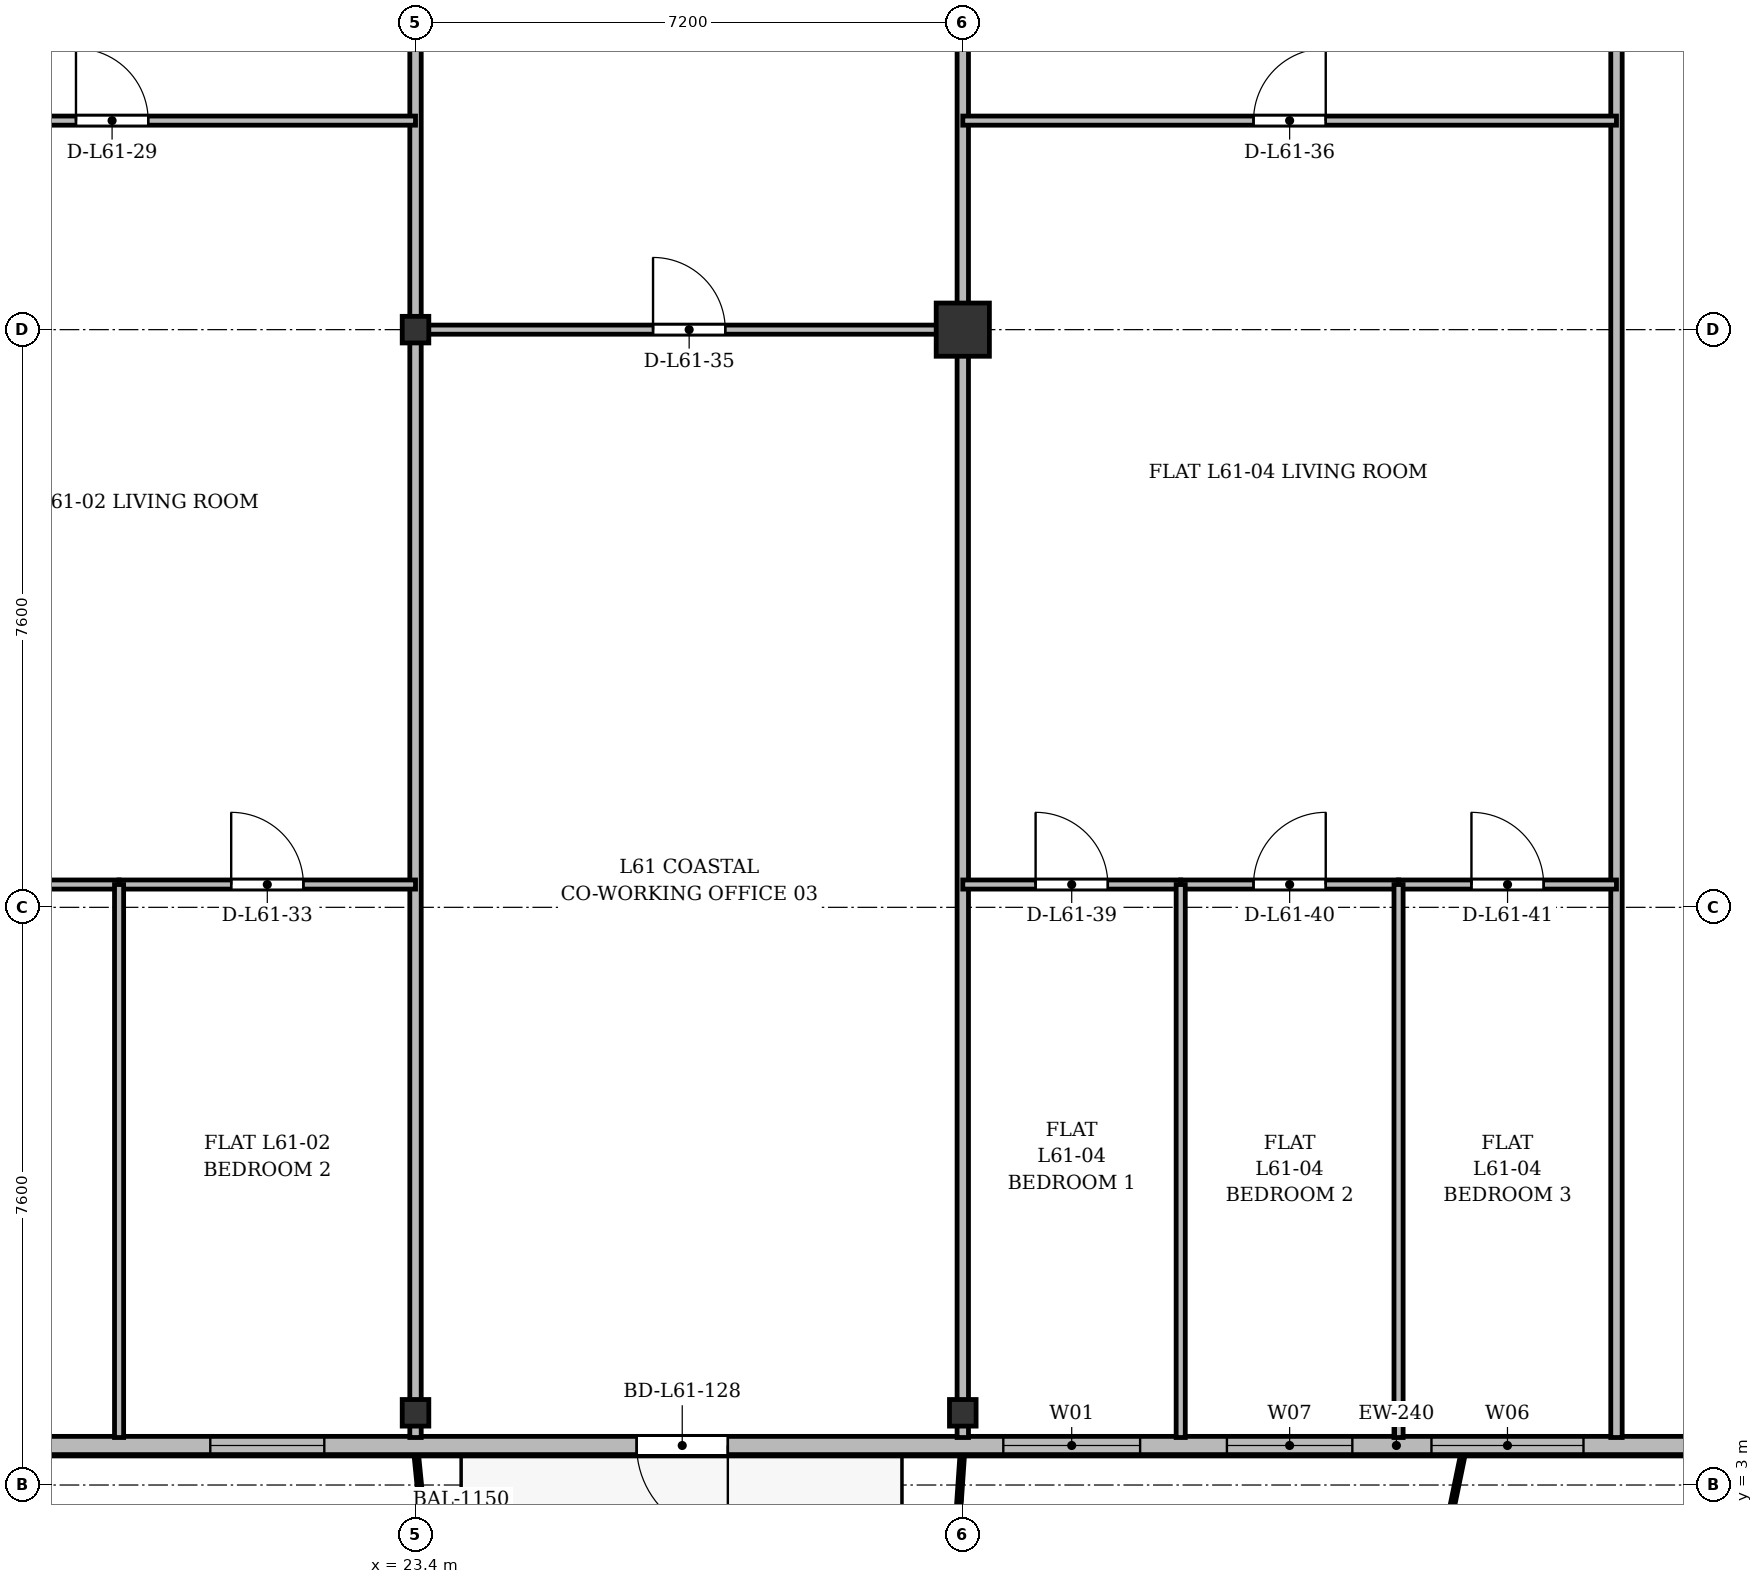
"""IFC4 building model, lengths in metres.
Left out: names, types, materials, properties, quantities, classifications, styles, units other than length and angle.
Written with IfcOpenShell. Run it as: python <this file> out.ifc"""

import sys

from ifc_helpers import new_model, si_unit, direction, frame, frame_2d, origin, origin_2d, place, context, subcontext, project, spatial, rectangle, i_section, extrude, source, transform, mapped, element, fill, save


model = new_model("IFC4")
c1 = context("Model", 3, precision=1e-05, world=origin(), true_north=direction((0.0, 1.0)))
c2 = subcontext(c1, "Body", "Model", "MODEL_VIEW")
j1 = project(units=[si_unit("LENGTHUNIT", "METRE"), si_unit("PLANEANGLEUNIT", "RADIAN")], contexts=[c1])
p1 = place(None, origin())
s1 = spatial("IfcSite", under=j1, at=p1, CompositionType="ELEMENT")
p2 = place(p1, origin())
s2 = spatial("IfcBuilding", under=s1, at=p2, CompositionType="ELEMENT")
p3 = place(p2, frame((0.0, 0.0, 233.7)))
s3 = spatial("IfcBuildingStorey", under=s2, at=p3, CompositionType="ELEMENT", Elevation=233.7)
m1 = source(origin(), c2, "Body", "SweptSolid", [
    extrude(i_section(OverallWidth=0.35, OverallDepth=0.35, WebThickness=0.018, FlangeThickness=0.028, at=origin_2d()), origin(), (0.0, 0.0, 1.0), 3.6),
])
for number, where, z_axis, x_axis in (
    (1, (23.4, 3.95, 0.0), (0.0, 0.0, 1.0), (1.0, 0.0, 0.0)),
    (2, (23.4, 18.2, 0.0), (0.0, 0.0, 1.0), (1.0, 0.0, 0.0)),
    (3, (30.6, 3.95, 0.0), (0.0, 0.0, 1.0), (1.0, 0.0, 0.0)),
):
    element("IfcColumn", number, at=place(p3, frame(where, z_axis=z_axis, x_axis=x_axis)), inside=s3, PredefinedType="COLUMN", context=c2, shape_type="MappedRepresentation", body=[
        mapped(m1, transform((0.0, 0.0, 0.0), x_axis=(1.0, 0.0, 0.0), y_axis=(0.0, 1.0, 0.0), z_axis=(0.0, 0.0, 1.0), scale=1.0)),
    ])
m2 = source(origin(), c2, "Body", "SweptSolid", [
    extrude(rectangle(XDim=0.7, YDim=0.7, at=origin_2d()), origin(), (0.0, 0.0, 1.0), 3.6),
])
p4 = place(p3, frame((30.6, 18.2, 0.0), z_axis=(0.0, 0.0, 1.0), x_axis=(1.0, 0.0, 0.0)))
e4 = element("IfcColumn", 4, at=p4, inside=s3, PredefinedType="COLUMN", context=c2, shape_type="MappedRepresentation", body=[
    mapped(m2, transform((0.0, 0.0, 0.0), x_axis=(1.0, 0.0, 0.0), y_axis=(0.0, 1.0, 0.0), z_axis=(0.0, 0.0, 1.0), scale=1.0)),
])
p5 = place(p3, frame((44.8, 3.52, 0.0), z_axis=(0.0, 0.0, 1.0), x_axis=(-1.0, 0.0, 0.0)))
e5 = element("IfcWall", 5, at=p5, inside=s3, PredefinedType="SOLIDWALL", context=c2, shape_type="SweptSolid", body=[
    extrude(rectangle(XDim=33.8, YDim=0.24, at=frame_2d((16.9, 0.0))), origin(), (0.0, 0.0, 1.0), 3.36),
])
p6 = place(p5, frame((2.55, 0.0, 0.9)))
e6 = element("IfcOpeningElement", 6, at=p6, cuts=e5, PredefinedType="OPENING", context=c2, shape_type="SweptSolid", body=[
    extrude(rectangle(XDim=1.5, YDim=1.75, at=frame_2d((0.75, 0.875))), frame((0.0, 0.13, 0.0), z_axis=(0.0, -1.0, 0.0), x_axis=(1.0, 0.0, 0.0)), (0.0, 0.0, 1.0), 0.26),
])
p7 = place(p5, frame((6.034, 0.0, 0.9)))
e7 = element("IfcOpeningElement", 7, at=p7, cuts=e5, PredefinedType="OPENING", context=c2, shape_type="SweptSolid", body=[
    extrude(rectangle(XDim=2.0, YDim=1.95, at=frame_2d((1.0, 0.975))), frame((0.0, 0.13, 0.0), z_axis=(0.0, -1.0, 0.0), x_axis=(1.0, 0.0, 0.0)), (0.0, 0.0, 1.0), 0.26),
])
p8 = place(p5, frame((9.075, 0.0, 0.9)))
e8 = element("IfcOpeningElement", 8, at=p8, cuts=e5, PredefinedType="OPENING", context=c2, shape_type="SweptSolid", body=[
    extrude(rectangle(XDim=1.65, YDim=1.85, at=frame_2d((0.825, 0.925))), frame((0.0, 0.13, 0.0), z_axis=(0.0, -1.0, 0.0), x_axis=(1.0, 0.0, 0.0)), (0.0, 0.0, 1.0), 0.26),
])
p9 = place(p5, frame((11.867, 0.0, 0.9)))
e9 = element("IfcOpeningElement", 9, at=p9, cuts=e5, PredefinedType="OPENING", context=c2, shape_type="SweptSolid", body=[
    extrude(rectangle(XDim=1.8, YDim=1.8, at=frame_2d((0.9, 0.9))), frame((0.0, 0.13, 0.0), z_axis=(0.0, -1.0, 0.0), x_axis=(1.0, 0.0, 0.0)), (0.0, 0.0, 1.0), 0.26),
])
p10 = place(p5, frame((17.291, 0.0, 0.0)))
e10 = element("IfcOpeningElement", 10, at=p10, cuts=e5, PredefinedType="OPENING", context=c2, shape_type="SweptSolid", body=[
    extrude(rectangle(XDim=1.2, YDim=2.2, at=frame_2d((0.6, 1.1))), frame((0.0, 0.13, 0.0), z_axis=(0.0, -1.0, 0.0), x_axis=(1.0, 0.0, 0.0)), (0.0, 0.0, 1.0), 0.26),
])
p11 = place(p5, frame((22.6, 0.0, 0.9)))
e11 = element("IfcOpeningElement", 11, at=p11, cuts=e5, PredefinedType="OPENING", context=c2, shape_type="SweptSolid", body=[
    extrude(rectangle(XDim=1.5, YDim=1.75, at=frame_2d((0.75, 0.875))), frame((0.0, 0.13, 0.0), z_axis=(0.0, -1.0, 0.0), x_axis=(1.0, 0.0, 0.0)), (0.0, 0.0, 1.0), 0.26),
])
p12 = place(p5, frame((26.25, 0.0, 0.9)))
e12 = element("IfcOpeningElement", 12, at=p12, cuts=e5, PredefinedType="OPENING", context=c2, shape_type="SweptSolid", body=[
    extrude(rectangle(XDim=2.0, YDim=1.95, at=frame_2d((1.0, 0.975))), frame((0.0, 0.13, 0.0), z_axis=(0.0, -1.0, 0.0), x_axis=(1.0, 0.0, 0.0)), (0.0, 0.0, 1.0), 0.26),
])
p13 = place(p5, frame((30.63, 0.0, 0.9)))
e13 = element("IfcOpeningElement", 13, at=p13, cuts=e5, PredefinedType="OPENING", context=c2, shape_type="SweptSolid", body=[
    extrude(rectangle(XDim=1.65, YDim=1.85, at=frame_2d((0.825, 0.925))), frame((0.0, 0.13, 0.0), z_axis=(0.0, -1.0, 0.0), x_axis=(1.0, 0.0, 0.0)), (0.0, 0.0, 1.0), 0.26),
])
for number, where, z_axis, x_axis in (
    (14, (23.4, 3.625, 0.0), (0.0, 0.0, 1.0), (0.0, 1.0, 0.0)),
    (15, (30.6, 3.625, 0.0), (0.0, 0.0, 1.0), (0.0, 1.0, 0.0)),
):
    element("IfcWall", number, at=place(p3, frame(where, z_axis=z_axis, x_axis=x_axis)), inside=s3, PredefinedType="PARTITIONING", context=c2, shape_type="SweptSolid", body=[
        extrude(rectangle(XDim=27.375, YDim=0.15, at=frame_2d((13.688, 0.0))), origin(), (0.0, 0.0, 1.0), 2.86),
    ])
p14 = place(p3, frame((39.2, 3.625, 0.0), z_axis=(0.0, 0.0, 1.0), x_axis=(0.0, 1.0, 0.0)))
e16 = element("IfcWall", 16, at=p14, inside=s3, PredefinedType="PARTITIONING", context=c2, shape_type="SweptSolid", body=[
    extrude(rectangle(XDim=27.375, YDim=0.15, at=frame_2d((13.688, 0.0))), origin(), (0.0, 0.0, 1.0), 2.91),
])
p15 = place(p3, frame((15.6, 20.95, 0.0), z_axis=(0.0, 0.0, 1.0), x_axis=(1.0, 0.0, 0.0)))
e17 = element("IfcWall", 17, at=p15, inside=s3, PredefinedType="PARTITIONING", context=c2, shape_type="SweptSolid", body=[
    extrude(rectangle(XDim=7.8, YDim=0.12, at=frame_2d((3.9, 0.0))), origin(), (0.0, 0.0, 1.0), 2.86),
])
p16 = place(p15, frame((3.333, 0.0, 0.0)))
e18 = element("IfcOpeningElement", 18, at=p16, cuts=e17, PredefinedType="OPENING", context=c2, shape_type="SweptSolid", body=[
    extrude(rectangle(XDim=0.95, YDim=2.15, at=frame_2d((0.475, 1.075))), frame((0.0, 0.07, 0.0), z_axis=(0.0, -1.0, 0.0), x_axis=(1.0, 0.0, 0.0)), (0.0, 0.0, 1.0), 0.14),
])
p17 = place(p3, frame((15.6, 10.9, 0.0), z_axis=(0.0, 0.0, 1.0), x_axis=(1.0, 0.0, 0.0)))
e19 = element("IfcWall", 19, at=p17, inside=s3, PredefinedType="PARTITIONING", context=c2, shape_type="SweptSolid", body=[
    extrude(rectangle(XDim=3.9, YDim=0.12, at=frame_2d((1.95, 0.0))), origin(), (0.0, 0.0, 1.0), 2.86),
])
p18 = place(p17, frame((1.475, 0.0, 0.0)))
e20 = element("IfcOpeningElement", 20, at=p18, cuts=e19, PredefinedType="OPENING", context=c2, shape_type="SweptSolid", body=[
    extrude(rectangle(XDim=0.95, YDim=2.15, at=frame_2d((0.475, 1.075))), frame((0.0, 0.07, 0.0), z_axis=(0.0, -1.0, 0.0), x_axis=(1.0, 0.0, 0.0)), (0.0, 0.0, 1.0), 0.14),
])
p19 = place(p3, frame((19.5, 10.9, 0.0), z_axis=(0.0, 0.0, 1.0), x_axis=(1.0, 0.0, 0.0)))
e21 = element("IfcWall", 21, at=p19, inside=s3, PredefinedType="PARTITIONING", context=c2, shape_type="SweptSolid", body=[
    extrude(rectangle(XDim=3.9, YDim=0.12, at=frame_2d((1.95, 0.0))), origin(), (0.0, 0.0, 1.0), 2.86),
])
p20 = place(p19, frame((1.475, 0.0, 0.0)))
e22 = element("IfcOpeningElement", 22, at=p20, cuts=e21, PredefinedType="OPENING", context=c2, shape_type="SweptSolid", body=[
    extrude(rectangle(XDim=0.95, YDim=2.15, at=frame_2d((0.475, 1.075))), frame((0.0, 0.07, 0.0), z_axis=(0.0, -1.0, 0.0), x_axis=(1.0, 0.0, 0.0)), (0.0, 0.0, 1.0), 0.14),
])
p21 = place(p3, frame((19.5, 3.625, 0.0), z_axis=(0.0, 0.0, 1.0), x_axis=(0.0, 1.0, 0.0)))
e23 = element("IfcWall", 23, at=p21, inside=s3, PredefinedType="PARTITIONING", context=c2, shape_type="SweptSolid", body=[
    extrude(rectangle(XDim=7.275, YDim=0.12, at=frame_2d((3.637, 0.0))), origin(), (0.0, 0.0, 1.0), 2.91),
])
p22 = place(p3, frame((23.4, 18.2, 0.0), z_axis=(0.0, 0.0, 1.0), x_axis=(1.0, 0.0, 0.0)))
e24 = element("IfcWall", 24, at=p22, inside=s3, PredefinedType="PARTITIONING", context=c2, shape_type="SweptSolid", body=[
    extrude(rectangle(XDim=7.2, YDim=0.12, at=frame_2d((3.6, 0.0))), origin(), (0.0, 0.0, 1.0), 2.91),
])
p23 = place(p22, frame((3.125, 0.0, 0.0)))
e25 = element("IfcOpeningElement", 25, at=p23, cuts=e24, PredefinedType="OPENING", context=c2, shape_type="SweptSolid", body=[
    extrude(rectangle(XDim=0.95, YDim=2.15, at=frame_2d((0.475, 1.075))), frame((0.0, 0.07, 0.0), z_axis=(0.0, -1.0, 0.0), x_axis=(1.0, 0.0, 0.0)), (0.0, 0.0, 1.0), 0.14),
])
p24 = place(p3, frame((30.6, 20.95, 0.0), z_axis=(0.0, 0.0, 1.0), x_axis=(1.0, 0.0, 0.0)))
e26 = element("IfcWall", 26, at=p24, inside=s3, PredefinedType="PARTITIONING", context=c2, shape_type="SweptSolid", body=[
    extrude(rectangle(XDim=8.6, YDim=0.12, at=frame_2d((4.3, 0.0))), origin(), (0.0, 0.0, 1.0), 2.86),
])
p25 = place(p24, frame((3.825, 0.0, 0.0)))
e27 = element("IfcOpeningElement", 27, at=p25, cuts=e26, PredefinedType="OPENING", context=c2, shape_type="SweptSolid", body=[
    extrude(rectangle(XDim=0.95, YDim=2.15, at=frame_2d((0.475, 1.075))), frame((0.0, 0.07, 0.0), z_axis=(0.0, -1.0, 0.0), x_axis=(1.0, 0.0, 0.0)), (0.0, 0.0, 1.0), 0.14),
])
p26 = place(p3, frame((30.6, 10.9, 0.0), z_axis=(0.0, 0.0, 1.0), x_axis=(1.0, 0.0, 0.0)))
e28 = element("IfcWall", 28, at=p26, inside=s3, PredefinedType="PARTITIONING", context=c2, shape_type="SweptSolid", body=[
    extrude(rectangle(XDim=2.867, YDim=0.12, at=frame_2d((1.434, 0.0))), origin(), (0.0, 0.0, 1.0), 2.86),
])
p27 = place(p26, frame((0.958, 0.0, 0.0)))
e29 = element("IfcOpeningElement", 29, at=p27, cuts=e28, PredefinedType="OPENING", context=c2, shape_type="SweptSolid", body=[
    extrude(rectangle(XDim=0.95, YDim=2.15, at=frame_2d((0.475, 1.075))), frame((0.0, 0.07, 0.0), z_axis=(0.0, -1.0, 0.0), x_axis=(1.0, 0.0, 0.0)), (0.0, 0.0, 1.0), 0.14),
])
p28 = place(p3, frame((33.467, 10.9, 0.0), z_axis=(0.0, 0.0, 1.0), x_axis=(1.0, 0.0, 0.0)))
e30 = element("IfcWall", 30, at=p28, inside=s3, PredefinedType="PARTITIONING", context=c2, shape_type="SweptSolid", body=[
    extrude(rectangle(XDim=2.866, YDim=0.12, at=frame_2d((1.433, 0.0))), origin(), (0.0, 0.0, 1.0), 3.36),
])
p29 = place(p28, frame((0.958, 0.0, 0.0)))
e31 = element("IfcOpeningElement", 31, at=p29, cuts=e30, PredefinedType="OPENING", context=c2, shape_type="SweptSolid", body=[
    extrude(rectangle(XDim=0.95, YDim=2.15, at=frame_2d((0.475, 1.075))), frame((0.0, 0.07, 0.0), z_axis=(0.0, -1.0, 0.0), x_axis=(1.0, 0.0, 0.0)), (0.0, 0.0, 1.0), 0.14),
])
p30 = place(p3, frame((33.467, 3.625, 0.0), z_axis=(0.0, 0.0, 1.0), x_axis=(0.0, 1.0, 0.0)))
e32 = element("IfcWall", 32, at=p30, inside=s3, PredefinedType="PARTITIONING", context=c2, shape_type="SweptSolid", body=[
    extrude(rectangle(XDim=7.275, YDim=0.12, at=frame_2d((3.637, 0.0))), origin(), (0.0, 0.0, 1.0), 2.91),
])
p31 = place(p3, frame((36.333, 10.9, 0.0), z_axis=(0.0, 0.0, 1.0), x_axis=(1.0, 0.0, 0.0)))
e33 = element("IfcWall", 33, at=p31, inside=s3, PredefinedType="PARTITIONING", context=c2, shape_type="SweptSolid", body=[
    extrude(rectangle(XDim=2.867, YDim=0.12, at=frame_2d((1.434, 0.0))), origin(), (0.0, 0.0, 1.0), 3.36),
])
p32 = place(p31, frame((0.959, 0.0, 0.0)))
e34 = element("IfcOpeningElement", 34, at=p32, cuts=e33, PredefinedType="OPENING", context=c2, shape_type="SweptSolid", body=[
    extrude(rectangle(XDim=0.95, YDim=2.15, at=frame_2d((0.475, 1.075))), frame((0.0, 0.07, 0.0), z_axis=(0.0, -1.0, 0.0), x_axis=(1.0, 0.0, 0.0)), (0.0, 0.0, 1.0), 0.14),
])
p33 = place(p3, frame((36.333, 3.625, 0.0), z_axis=(0.0, 0.0, 1.0), x_axis=(0.0, 1.0, 0.0)))
e35 = element("IfcWall", 35, at=p33, inside=s3, PredefinedType="PARTITIONING", context=c2, shape_type="SweptSolid", body=[
    extrude(rectangle(XDim=7.275, YDim=0.12, at=frame_2d((3.637, 0.0))), origin(), (0.0, 0.0, 1.0), 2.91),
])
m3 = source(origin(), c2, "Body", "SweptSolid", [
    extrude(rectangle(XDim=2.0, YDim=1.95, at=frame_2d((1.0, 0.975))), frame((0.0, 0.03, 0.0), z_axis=(0.0, -1.0, 0.0), x_axis=(1.0, 0.0, 0.0)), (0.0, 0.0, 1.0), 0.06),
])
p34 = place(p7, origin())
e36 = element("IfcWindow", 36, at=p34, inside=s3, PartitioningType="SINGLE_PANEL", PredefinedType="WINDOW", context=c2, shape_type="MappedRepresentation", body=[
    mapped(m3, transform((0.0, 0.0, 0.0), x_axis=(1.0, 0.0, 0.0), y_axis=(0.0, 1.0, 0.0), z_axis=(0.0, 0.0, 1.0), scale=1.0)),
])
fill(e7, e36)
m4 = source(origin(), c2, "Body", "SweptSolid", [
    extrude(rectangle(XDim=1.65, YDim=1.85, at=frame_2d((0.825, 0.925))), frame((0.0, 0.03, 0.0), z_axis=(0.0, -1.0, 0.0), x_axis=(1.0, 0.0, 0.0)), (0.0, 0.0, 1.0), 0.06),
])
p35 = place(p8, origin())
e37 = element("IfcWindow", 37, at=p35, inside=s3, PartitioningType="SINGLE_PANEL", PredefinedType="WINDOW", context=c2, shape_type="MappedRepresentation", body=[
    mapped(m4, transform((0.0, 0.0, 0.0), x_axis=(1.0, 0.0, 0.0), y_axis=(0.0, 1.0, 0.0), z_axis=(0.0, 0.0, 1.0), scale=1.0)),
])
fill(e8, e37)
m5 = source(origin(), c2, "Body", "SweptSolid", [
    extrude(rectangle(XDim=1.8, YDim=1.8, at=frame_2d((0.9, 0.9))), frame((0.0, 0.03, 0.0), z_axis=(0.0, -1.0, 0.0), x_axis=(1.0, 0.0, 0.0)), (0.0, 0.0, 1.0), 0.06),
])
p36 = place(p9, origin())
e38 = element("IfcWindow", 38, at=p36, inside=s3, PartitioningType="SINGLE_PANEL", PredefinedType="WINDOW", context=c2, shape_type="MappedRepresentation", body=[
    mapped(m5, transform((0.0, 0.0, 0.0), x_axis=(1.0, 0.0, 0.0), y_axis=(0.0, 1.0, 0.0), z_axis=(0.0, 0.0, 1.0), scale=1.0)),
])
fill(e9, e38)
m6 = source(origin(), c2, "Body", "SweptSolid", [
    extrude(rectangle(XDim=1.2, YDim=2.2, at=frame_2d((0.6, 1.1))), frame((0.0, 0.025, 0.0), z_axis=(0.0, -1.0, 0.0), x_axis=(1.0, 0.0, 0.0)), (0.0, 0.0, 1.0), 0.05),
])
p37 = place(p10, origin())
e39 = element("IfcDoor", 39, at=p37, inside=s3, OperationType="SINGLE_SWING_LEFT", PredefinedType="DOOR", context=c2, shape_type="MappedRepresentation", body=[
    mapped(m6, transform((0.0, 0.0, 0.0), x_axis=(1.0, 0.0, 0.0), y_axis=(0.0, 1.0, 0.0), z_axis=(0.0, 0.0, 1.0), scale=1.0)),
])
fill(e10, e39)
m7 = source(origin(), c2, "Body", "SweptSolid", [
    extrude(rectangle(XDim=1.5, YDim=1.75, at=frame_2d((0.75, 0.875))), frame((0.0, 0.03, 0.0), z_axis=(0.0, -1.0, 0.0), x_axis=(1.0, 0.0, 0.0)), (0.0, 0.0, 1.0), 0.06),
])
p38 = place(p11, origin())
e40 = element("IfcWindow", 40, at=p38, inside=s3, PartitioningType="SINGLE_PANEL", PredefinedType="WINDOW", context=c2, shape_type="MappedRepresentation", body=[
    mapped(m7, transform((0.0, 0.0, 0.0), x_axis=(1.0, 0.0, 0.0), y_axis=(0.0, 1.0, 0.0), z_axis=(0.0, 0.0, 1.0), scale=1.0)),
])
fill(e11, e40)
m8 = source(origin(), c2, "Body", "SweptSolid", [
    extrude(rectangle(XDim=0.95, YDim=2.15, at=frame_2d((0.475, 1.075))), frame((0.0, 0.025, 0.0), z_axis=(0.0, -1.0, 0.0), x_axis=(1.0, 0.0, 0.0)), (0.0, 0.0, 1.0), 0.05),
])
p39 = place(p16, origin())
e41 = element("IfcDoor", 41, at=p39, inside=s3, OperationType="SINGLE_SWING_LEFT", PredefinedType="DOOR", context=c2, shape_type="MappedRepresentation", body=[
    mapped(m8, transform((0.0, 0.0, 0.0), x_axis=(1.0, 0.0, 0.0), y_axis=(0.0, 1.0, 0.0), z_axis=(0.0, 0.0, 1.0), scale=1.0)),
])
fill(e18, e41)
p40 = place(p20, origin())
e42 = element("IfcDoor", 42, at=p40, inside=s3, OperationType="SINGLE_SWING_LEFT", PredefinedType="DOOR", context=c2, shape_type="MappedRepresentation", body=[
    mapped(m8, transform((0.0, 0.0, 0.0), x_axis=(1.0, 0.0, 0.0), y_axis=(0.0, 1.0, 0.0), z_axis=(0.0, 0.0, 1.0), scale=1.0)),
])
fill(e22, e42)
p41 = place(p23, origin())
e43 = element("IfcDoor", 43, at=p41, inside=s3, OperationType="SINGLE_SWING_LEFT", PredefinedType="DOOR", context=c2, shape_type="MappedRepresentation", body=[
    mapped(m8, transform((0.0, 0.0, 0.0), x_axis=(1.0, 0.0, 0.0), y_axis=(0.0, 1.0, 0.0), z_axis=(0.0, 0.0, 1.0), scale=1.0)),
])
fill(e25, e43)
p42 = place(p25, origin())
e44 = element("IfcDoor", 44, at=p42, inside=s3, OperationType="SINGLE_SWING_RIGHT", PredefinedType="DOOR", context=c2, shape_type="MappedRepresentation", body=[
    mapped(m8, transform((0.0, 0.0, 0.0), x_axis=(1.0, 0.0, 0.0), y_axis=(0.0, 1.0, 0.0), z_axis=(0.0, 0.0, 1.0), scale=1.0)),
])
fill(e27, e44)
p43 = place(p27, origin())
e45 = element("IfcDoor", 45, at=p43, inside=s3, OperationType="SINGLE_SWING_LEFT", PredefinedType="DOOR", context=c2, shape_type="MappedRepresentation", body=[
    mapped(m8, transform((0.0, 0.0, 0.0), x_axis=(1.0, 0.0, 0.0), y_axis=(0.0, 1.0, 0.0), z_axis=(0.0, 0.0, 1.0), scale=1.0)),
])
fill(e29, e45)
p44 = place(p29, origin())
e46 = element("IfcDoor", 46, at=p44, inside=s3, OperationType="SINGLE_SWING_RIGHT", PredefinedType="DOOR", context=c2, shape_type="MappedRepresentation", body=[
    mapped(m8, transform((0.0, 0.0, 0.0), x_axis=(1.0, 0.0, 0.0), y_axis=(0.0, 1.0, 0.0), z_axis=(0.0, 0.0, 1.0), scale=1.0)),
])
fill(e31, e46)
p45 = place(p32, origin())
e47 = element("IfcDoor", 47, at=p45, inside=s3, OperationType="SINGLE_SWING_LEFT", PredefinedType="DOOR", context=c2, shape_type="MappedRepresentation", body=[
    mapped(m8, transform((0.0, 0.0, 0.0), x_axis=(1.0, 0.0, 0.0), y_axis=(0.0, 1.0, 0.0), z_axis=(0.0, 0.0, 1.0), scale=1.0)),
])
fill(e34, e47)
save(model, sys.argv[1])
